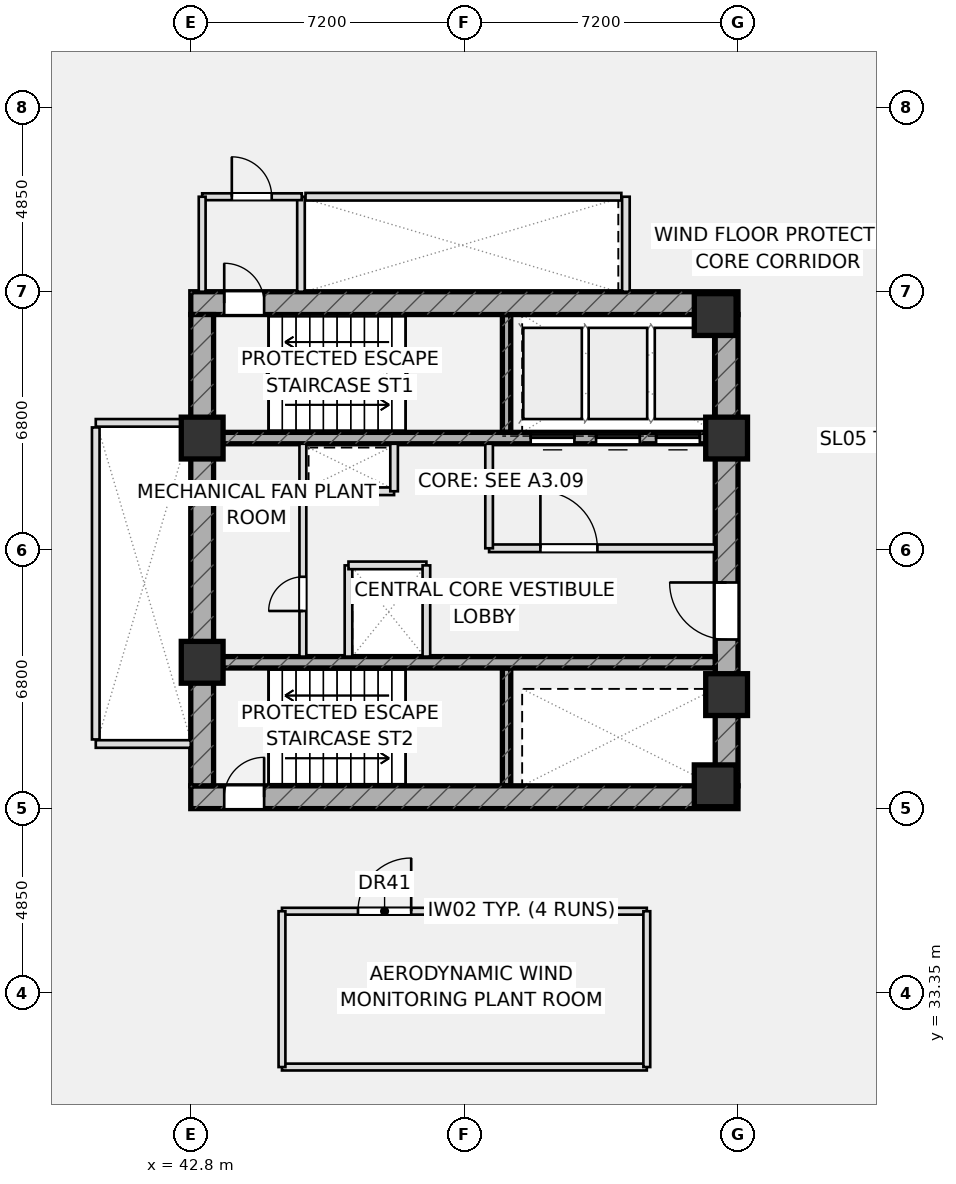
"""IFC4 building model, lengths in metres.
Left out: names, types, materials, properties, quantities, classifications, styles, units other than length and angle.
Written with IfcOpenShell. Run it as: python <this file> out.ifc"""

import sys

from ifc_helpers import new_model, si_unit, direction, frame, frame_2d, origin, origin_2d, place, context, subcontext, project, spatial, rectangle, extrude, element, fill, save


model = new_model("IFC4")
c1 = context("Model", 3, precision=1e-05, world=origin(), true_north=direction((0.0, 1.0)))
c2 = subcontext(c1, "Body", "Model", "MODEL_VIEW")
j1 = project(units=[si_unit("LENGTHUNIT", "METRE"), si_unit("PLANEANGLEUNIT", "RADIAN")], contexts=[c1])
p1 = place(None, origin())
s1 = spatial("IfcSite", under=j1, at=p1, CompositionType="ELEMENT")
p2 = place(p1, origin())
s2 = spatial("IfcBuilding", under=s1, at=p2, CompositionType="ELEMENT")
p3 = place(p2, frame((0.0, 0.0, 102.8)))
s3 = spatial("IfcBuildingStorey", under=s2, at=p3, CompositionType="ELEMENT", Elevation=102.8)
for number, where, z_axis, x_axis in (
    (1, (51.11, 48.1, 0.0), (0.0, 0.0, 1.0), (0.0, 1.0, 0.0)),
    (2, (51.11, 38.8, 0.0), (0.0, 0.0, 1.0), (0.0, 1.0, 0.0)),
):
    element("IfcWall", number, at=place(p3, frame(where, z_axis=z_axis, x_axis=x_axis)), inside=s3, PredefinedType="SHEAR", context=c2, shape_type="SweptSolid", body=[
        extrude(rectangle(XDim=3.1, YDim=0.22, at=frame_2d((1.55, 0.0))), origin(), (0.0, 0.0, 1.0), 7.3),
    ])
p4 = place(p3, frame((42.8, 51.5, 0.0), z_axis=(0.0, 0.0, 1.0), x_axis=(1.0, 0.0, 0.0)))
e3 = element("IfcWall", 3, at=p4, inside=s3, PredefinedType="SHEAR", context=c2, shape_type="SweptSolid", body=[
    extrude(rectangle(XDim=14.4, YDim=0.6, at=frame_2d((7.2, 0.0))), origin(), (0.0, 0.0, 1.0), 7.3),
])
p5 = place(p4, frame((0.88, 0.0, 0.0)))
e4 = element("IfcOpeningElement", 4, at=p5, cuts=e3, PredefinedType="OPENING", context=c2, shape_type="SweptSolid", body=[
    extrude(rectangle(XDim=1.05, YDim=2.2, at=frame_2d((0.525, 1.1))), frame((0.0, 0.31, 0.0), z_axis=(0.0, -1.0, 0.0), x_axis=(1.0, 0.0, 0.0)), (0.0, 0.0, 1.0), 0.62),
])
p6 = place(p3, frame((42.8, 38.5, 0.0), z_axis=(0.0, 0.0, 1.0), x_axis=(1.0, 0.0, 0.0)))
e5 = element("IfcWall", 5, at=p6, inside=s3, PredefinedType="SHEAR", context=c2, shape_type="SweptSolid", body=[
    extrude(rectangle(XDim=14.4, YDim=0.6, at=frame_2d((7.2, 0.0))), origin(), (0.0, 0.0, 1.0), 7.3),
])
p7 = place(p6, frame((0.88, 0.0, 0.0)))
e6 = element("IfcOpeningElement", 6, at=p7, cuts=e5, PredefinedType="OPENING", context=c2, shape_type="SweptSolid", body=[
    extrude(rectangle(XDim=1.05, YDim=2.2, at=frame_2d((0.525, 1.1))), frame((0.0, 0.31, 0.0), z_axis=(0.0, -1.0, 0.0), x_axis=(1.0, 0.0, 0.0)), (0.0, 0.0, 1.0), 0.62),
])
p8 = place(p3, frame((43.1, 38.8, 0.0), z_axis=(0.0, 0.0, 1.0), x_axis=(0.0, 1.0, 0.0)))
e7 = element("IfcWall", 7, at=p8, inside=s3, PredefinedType="SHEAR", context=c2, shape_type="SweptSolid", body=[
    extrude(rectangle(XDim=12.4, YDim=0.6, at=frame_2d((6.2, 0.0))), origin(), (0.0, 0.0, 1.0), 7.3),
])
p9 = place(p3, frame((56.9, 38.8, 0.0), z_axis=(0.0, 0.0, 1.0), x_axis=(0.0, 1.0, 0.0)))
e8 = element("IfcWall", 8, at=p9, inside=s3, PredefinedType="SHEAR", context=c2, shape_type="SweptSolid", body=[
    extrude(rectangle(XDim=12.4, YDim=0.6, at=frame_2d((6.2, 0.0))), origin(), (0.0, 0.0, 1.0), 7.3),
])
p10 = place(p9, frame((3.85, 0.0, 0.0)))
e9 = element("IfcOpeningElement", 9, at=p10, cuts=e8, PredefinedType="OPENING", context=c2, shape_type="SweptSolid", body=[
    extrude(rectangle(XDim=1.5, YDim=2.2, at=frame_2d((0.75, 1.1))), frame((0.0, 0.31, 0.0), z_axis=(0.0, -1.0, 0.0), x_axis=(1.0, 0.0, 0.0)), (0.0, 0.0, 1.0), 0.62),
])
p11 = place(p3, frame((43.4, 47.95, 0.0), z_axis=(0.0, 0.0, 1.0), x_axis=(1.0, 0.0, 0.0)))
e10 = element("IfcWall", 10, at=p11, inside=s3, PredefinedType="SHEAR", context=c2, shape_type="SweptSolid", body=[
    extrude(rectangle(XDim=13.2, YDim=0.3, at=frame_2d((6.6, 0.0))), origin(), (0.0, 0.0, 1.0), 7.3),
])
p12 = place(p11, frame((8.345, 0.0, 0.0)))
e11 = element("IfcOpeningElement", 11, at=p12, cuts=e10, PredefinedType="OPENING", context=c2, shape_type="SweptSolid", body=[
    extrude(rectangle(XDim=1.15, YDim=2.2, at=frame_2d((0.575, 1.1))), frame((0.0, 0.16, 0.0), z_axis=(0.0, -1.0, 0.0), x_axis=(1.0, 0.0, 0.0)), (0.0, 0.0, 1.0), 0.32),
])
p13 = place(p11, frame((10.065, 0.0, 0.0)))
e12 = element("IfcOpeningElement", 12, at=p13, cuts=e10, PredefinedType="OPENING", context=c2, shape_type="SweptSolid", body=[
    extrude(rectangle(XDim=1.15, YDim=2.2, at=frame_2d((0.575, 1.1))), frame((0.0, 0.16, 0.0), z_axis=(0.0, -1.0, 0.0), x_axis=(1.0, 0.0, 0.0)), (0.0, 0.0, 1.0), 0.32),
])
p14 = place(p11, frame((11.645, 0.0, 0.0)))
e13 = element("IfcOpeningElement", 13, at=p14, cuts=e10, PredefinedType="OPENING", context=c2, shape_type="SweptSolid", body=[
    extrude(rectangle(XDim=1.15, YDim=2.2, at=frame_2d((0.575, 1.1))), frame((0.0, 0.16, 0.0), z_axis=(0.0, -1.0, 0.0), x_axis=(1.0, 0.0, 0.0)), (0.0, 0.0, 1.0), 0.32),
])
p15 = place(p3, frame((43.4, 42.05, 0.0), z_axis=(0.0, 0.0, 1.0), x_axis=(1.0, 0.0, 0.0)))
e14 = element("IfcWall", 14, at=p15, inside=s3, PredefinedType="SHEAR", context=c2, shape_type="SweptSolid", body=[
    extrude(rectangle(XDim=13.2, YDim=0.3, at=frame_2d((6.6, 0.0))), origin(), (0.0, 0.0, 1.0), 7.3),
])
for number, where, z_axis, x_axis in (
    (15, (43.1, 47.95, 0.0), (0.0, 0.0, 1.0), (1.0, 0.0, 0.0)),
    (16, (56.9, 47.95, 0.0), (0.0, 0.0, 1.0), (1.0, 0.0, 0.0)),
    (17, (56.6, 51.2, 0.0), (0.0, 0.0, 1.0), (1.0, 0.0, 0.0)),
    (18, (43.1, 42.05, 0.0), (0.0, 0.0, 1.0), (1.0, 0.0, 0.0)),
    (19, (56.9, 41.2, 0.0), (0.0, 0.0, 1.0), (1.0, 0.0, 0.0)),
    (20, (56.6, 38.8, 0.0), (0.0, 0.0, 1.0), (1.0, 0.0, 0.0)),
):
    element("IfcColumn", number, at=place(p3, frame(where, z_axis=z_axis, x_axis=x_axis)), inside=s3, PredefinedType="COLUMN", context=c2, shape_type="SweptSolid", body=[
        extrude(rectangle(XDim=1.1, YDim=1.1, at=origin_2d()), origin(), (0.0, 0.0, 1.0), 7.3),
    ])
for number, where, z_axis, x_axis in (
    (21, (40.3, 39.9, 0.0), (0.0, 0.0, 1.0), (1.0, 0.0, 0.0)),
    (22, (40.3, 48.35, 0.0), (0.0, 0.0, 1.0), (1.0, 0.0, 0.0)),
    (23, (45.7, 51.8, 0.0), (0.0, 0.0, 1.0), (0.0, 1.0, 0.0)),
):
    element("IfcWall", number, at=place(p3, frame(where, z_axis=z_axis, x_axis=x_axis)), inside=s3, PredefinedType="PARTITIONING", context=c2, shape_type="SweptSolid", body=[
        extrude(rectangle(XDim=2.5, YDim=0.2, at=frame_2d((1.25, 0.0))), origin(), (0.0, 0.0, 1.0), 7.3),
    ])
p16 = place(p3, frame((54.25, 51.8, 0.0), z_axis=(0.0, 0.0, 1.0), x_axis=(0.0, 1.0, 0.0)))
e24 = element("IfcWall", 24, at=p16, inside=s3, PredefinedType="PARTITIONING", context=c2, shape_type="SweptSolid", body=[
    extrude(rectangle(XDim=2.5, YDim=0.2, at=frame_2d((1.25, 0.0))), origin(), (0.0, 0.0, 1.0), 4.775),
])
p17 = place(p3, frame((45.75, 46.55, 0.0), z_axis=(0.0, 0.0, 1.0), x_axis=(1.0, 0.0, 0.0)))
e25 = element("IfcWall", 25, at=p17, inside=s3, PredefinedType="PARTITIONING", context=c2, shape_type="SweptSolid", body=[
    extrude(rectangle(XDim=2.4, YDim=0.2, at=frame_2d((1.2, 0.0))), origin(), (0.0, 0.0, 1.0), 7.3),
])
p18 = place(p3, frame((48.15, 46.55, 0.0), z_axis=(0.0, 0.0, 1.0), x_axis=(0.0, 1.0, 0.0)))
e26 = element("IfcWall", 26, at=p18, inside=s3, PredefinedType="PARTITIONING", context=c2, shape_type="SweptSolid", body=[
    extrude(rectangle(XDim=1.25, YDim=0.2, at=frame_2d((0.625, 0.0))), origin(), (0.0, 0.0, 1.0), 7.3),
])
p19 = place(p3, frame((46.95, 42.2, 0.0), z_axis=(0.0, 0.0, 1.0), x_axis=(0.0, 1.0, 0.0)))
e27 = element("IfcWall", 27, at=p19, inside=s3, PredefinedType="PARTITIONING", context=c2, shape_type="SweptSolid", body=[
    extrude(rectangle(XDim=2.4, YDim=0.2, at=frame_2d((1.2, 0.0))), origin(), (0.0, 0.0, 1.0), 7.3),
])
p20 = place(p3, frame((46.95, 44.6, 0.0), z_axis=(0.0, 0.0, 1.0), x_axis=(1.0, 0.0, 0.0)))
e28 = element("IfcWall", 28, at=p20, inside=s3, PredefinedType="PARTITIONING", context=c2, shape_type="SweptSolid", body=[
    extrude(rectangle(XDim=2.05, YDim=0.2, at=frame_2d((1.025, 0.0))), origin(), (0.0, 0.0, 1.0), 7.3),
])
p21 = place(p3, frame((50.65, 45.05, 0.0), z_axis=(0.0, 0.0, 1.0), x_axis=(1.0, 0.0, 0.0)))
e29 = element("IfcWall", 29, at=p21, inside=s3, PredefinedType="PARTITIONING", context=c2, shape_type="SweptSolid", body=[
    extrude(rectangle(XDim=5.95, YDim=0.2, at=frame_2d((2.975, 0.0))), origin(), (0.0, 0.0, 1.0), 7.3),
])
p22 = place(p21, frame((1.35, 0.0, 0.0)))
e30 = element("IfcOpeningElement", 30, at=p22, cuts=e29, PredefinedType="OPENING", context=c2, shape_type="SweptSolid", body=[
    extrude(rectangle(XDim=1.5, YDim=2.2, at=frame_2d((0.75, 1.1))), frame((0.0, 0.11, 0.0), z_axis=(0.0, -1.0, 0.0), x_axis=(1.0, 0.0, 0.0)), (0.0, 0.0, 1.0), 0.22),
])
p23 = place(p3, frame((50.65, 45.05, 0.0), z_axis=(0.0, 0.0, 1.0), x_axis=(0.0, 1.0, 0.0)))
e31 = element("IfcWall", 31, at=p23, inside=s3, PredefinedType="PARTITIONING", context=c2, shape_type="SweptSolid", body=[
    extrude(rectangle(XDim=2.75, YDim=0.2, at=frame_2d((1.375, 0.0))), origin(), (0.0, 0.0, 1.0), 7.3),
])
p24 = place(p3, frame((45.75, 42.2, 0.0), z_axis=(0.0, 0.0, 1.0), x_axis=(0.0, 1.0, 0.0)))
e32 = element("IfcWall", 32, at=p24, inside=s3, PredefinedType="PARTITIONING", context=c2, shape_type="SweptSolid", body=[
    extrude(rectangle(XDim=5.6, YDim=0.18, at=frame_2d((2.8, 0.0))), origin(), (0.0, 0.0, 1.0), 7.3),
])
p25 = place(p24, frame((1.2, 0.0, 0.0)))
e33 = element("IfcOpeningElement", 33, at=p25, cuts=e32, PredefinedType="OPENING", context=c2, shape_type="SweptSolid", body=[
    extrude(rectangle(XDim=0.9, YDim=2.05, at=frame_2d((0.45, 1.025))), frame((0.0, 0.1, 0.0), z_axis=(0.0, -1.0, 0.0), x_axis=(1.0, 0.0, 0.0)), (0.0, 0.0, 1.0), 0.2),
])
p26 = place(p3, frame((43.1, 54.3, 0.0), z_axis=(0.0, 0.0, 1.0), x_axis=(1.0, 0.0, 0.0)))
e34 = element("IfcWall", 34, at=p26, inside=s3, PredefinedType="PARTITIONING", context=c2, shape_type="SweptSolid", body=[
    extrude(rectangle(XDim=2.62, YDim=0.18, at=frame_2d((1.31, 0.0))), origin(), (0.0, 0.0, 1.0), 4.775),
])
p27 = place(p26, frame((0.78, 0.0, 0.0)))
e35 = element("IfcOpeningElement", 35, at=p27, cuts=e34, PredefinedType="OPENING", context=c2, shape_type="SweptSolid", body=[
    extrude(rectangle(XDim=1.05, YDim=2.2, at=frame_2d((0.525, 1.1))), frame((0.0, 0.1, 0.0), z_axis=(0.0, -1.0, 0.0), x_axis=(1.0, 0.0, 0.0)), (0.0, 0.0, 1.0), 0.2),
])
p28 = place(p3, frame((43.1, 51.8, 0.0), z_axis=(0.0, 0.0, 1.0), x_axis=(0.0, 1.0, 0.0)))
e36 = element("IfcWall", 36, at=p28, inside=s3, PredefinedType="PARTITIONING", context=c2, shape_type="SweptSolid", body=[
    extrude(rectangle(XDim=2.5, YDim=0.18, at=frame_2d((1.25, 0.0))), origin(), (0.0, 0.0, 1.0), 4.775),
])
p29 = place(p3, frame((45.2, 35.5, 0.0), z_axis=(0.0, 0.0, 1.0), x_axis=(1.0, 0.0, 0.0)))
e37 = element("IfcWall", 37, at=p29, inside=s3, PredefinedType="PARTITIONING", context=c2, shape_type="SweptSolid", body=[
    extrude(rectangle(XDim=9.6, YDim=0.18, at=frame_2d((4.8, 0.0))), origin(), (0.0, 0.0, 1.0), 7.3),
])
p30 = place(p29, frame((2.0, 0.0, 0.0)))
e38 = element("IfcOpeningElement", 38, at=p30, cuts=e37, PredefinedType="OPENING", context=c2, shape_type="SweptSolid", body=[
    extrude(rectangle(XDim=1.4, YDim=2.15, at=frame_2d((0.7, 1.075))), frame((0.0, 0.1, 0.0), z_axis=(0.0, -1.0, 0.0), x_axis=(1.0, 0.0, 0.0)), (0.0, 0.0, 1.0), 0.2),
])
p31 = place(p3, frame((45.2, 31.4, 0.0), z_axis=(0.0, 0.0, 1.0), x_axis=(1.0, 0.0, 0.0)))
e39 = element("IfcWall", 39, at=p31, inside=s3, PredefinedType="PARTITIONING", context=c2, shape_type="SweptSolid", body=[
    extrude(rectangle(XDim=9.6, YDim=0.18, at=frame_2d((4.8, 0.0))), origin(), (0.0, 0.0, 1.0), 4.775),
])
p32 = place(p3, frame((45.2, 31.4, 0.0), z_axis=(0.0, 0.0, 1.0), x_axis=(0.0, 1.0, 0.0)))
e40 = element("IfcWall", 40, at=p32, inside=s3, PredefinedType="PARTITIONING", context=c2, shape_type="SweptSolid", body=[
    extrude(rectangle(XDim=4.1, YDim=0.18, at=frame_2d((2.05, 0.0))), origin(), (0.0, 0.0, 1.0), 4.775),
])
p33 = place(p3, frame((54.8, 31.4, 0.0), z_axis=(0.0, 0.0, 1.0), x_axis=(0.0, 1.0, 0.0)))
e41 = element("IfcWall", 41, at=p33, inside=s3, PredefinedType="PARTITIONING", context=c2, shape_type="SweptSolid", body=[
    extrude(rectangle(XDim=4.1, YDim=0.18, at=frame_2d((2.05, 0.0))), origin(), (0.0, 0.0, 1.0), 7.3),
])
p34 = place(p3, frame((40.3, 40.02, 0.0), z_axis=(0.0, 0.0, 1.0), x_axis=(0.0, 1.0, 0.0)))
e42 = element("IfcWall", 42, at=p34, inside=s3, PredefinedType="PARTITIONING", context=c2, shape_type="SweptSolid", body=[
    extrude(rectangle(XDim=8.21, YDim=0.2, at=frame_2d((4.105, 0.0))), origin(), (0.0, 0.0, 1.0), 7.3),
])
p35 = place(p3, frame((49.0, 42.2, 0.0), z_axis=(0.0, 0.0, 1.0), x_axis=(0.0, 1.0, 0.0)))
e43 = element("IfcWall", 43, at=p35, inside=s3, PredefinedType="PARTITIONING", context=c2, shape_type="SweptSolid", body=[
    extrude(rectangle(XDim=2.4, YDim=0.2, at=frame_2d((1.2, 0.0))), origin(), (0.0, 0.0, 1.0), 7.3),
])
p36 = place(p3, frame((45.82, 54.3, 0.0), z_axis=(0.0, 0.0, 1.0), x_axis=(1.0, 0.0, 0.0)))
e44 = element("IfcWall", 44, at=p36, inside=s3, PredefinedType="PARTITIONING", context=c2, shape_type="SweptSolid", body=[
    extrude(rectangle(XDim=8.31, YDim=0.2, at=frame_2d((4.155, 0.0))), origin(), (0.0, 0.0, 1.0), 4.775),
])
p37 = place(p5, origin())
e45 = element("IfcDoor", 45, at=p37, inside=s3, OperationType="SINGLE_SWING_LEFT", PredefinedType="DOOR", context=c2, shape_type="SweptSolid", body=[
    extrude(rectangle(XDim=1.05, YDim=2.2, at=frame_2d((0.525, 1.1))), frame((0.0, 0.025, 0.0), z_axis=(0.0, -1.0, 0.0), x_axis=(1.0, 0.0, 0.0)), (0.0, 0.0, 1.0), 0.05),
])
fill(e4, e45)
p38 = place(p7, origin())
e46 = element("IfcDoor", 46, at=p38, inside=s3, OperationType="SINGLE_SWING_RIGHT", PredefinedType="DOOR", context=c2, shape_type="SweptSolid", body=[
    extrude(rectangle(XDim=1.05, YDim=2.2, at=frame_2d((0.525, 1.1))), frame((0.0, 0.025, 0.0), z_axis=(0.0, -1.0, 0.0), x_axis=(1.0, 0.0, 0.0)), (0.0, 0.0, 1.0), 0.05),
])
fill(e6, e46)
p39 = place(p10, origin())
e47 = element("IfcDoor", 47, at=p39, inside=s3, OperationType="SINGLE_SWING_RIGHT", PredefinedType="DOOR", context=c2, shape_type="SweptSolid", body=[
    extrude(rectangle(XDim=1.5, YDim=2.2, at=frame_2d((0.75, 1.1))), frame((0.0, 0.025, 0.0), z_axis=(0.0, -1.0, 0.0), x_axis=(1.0, 0.0, 0.0)), (0.0, 0.0, 1.0), 0.05),
])
fill(e9, e47)
p40 = place(p22, origin())
e48 = element("IfcDoor", 48, at=p40, inside=s3, OperationType="SINGLE_SWING_LEFT", PredefinedType="DOOR", context=c2, shape_type="SweptSolid", body=[
    extrude(rectangle(XDim=1.5, YDim=2.2, at=frame_2d((0.75, 1.1))), frame((0.0, 0.025, 0.0), z_axis=(0.0, -1.0, 0.0), x_axis=(1.0, 0.0, 0.0)), (0.0, 0.0, 1.0), 0.05),
])
fill(e30, e48)
p41 = place(p25, origin())
e49 = element("IfcDoor", 49, at=p41, inside=s3, OperationType="SINGLE_SWING_LEFT", PredefinedType="DOOR", context=c2, shape_type="SweptSolid", body=[
    extrude(rectangle(XDim=0.9, YDim=2.05, at=frame_2d((0.45, 1.025))), frame((0.0, 0.025, 0.0), z_axis=(0.0, -1.0, 0.0), x_axis=(1.0, 0.0, 0.0)), (0.0, 0.0, 1.0), 0.05),
])
fill(e33, e49)
p42 = place(p27, origin())
e50 = element("IfcDoor", 50, at=p42, inside=s3, OperationType="SINGLE_SWING_LEFT", PredefinedType="DOOR", context=c2, shape_type="SweptSolid", body=[
    extrude(rectangle(XDim=1.05, YDim=2.2, at=frame_2d((0.525, 1.1))), frame((0.0, 0.025, 0.0), z_axis=(0.0, -1.0, 0.0), x_axis=(1.0, 0.0, 0.0)), (0.0, 0.0, 1.0), 0.05),
])
fill(e35, e50)
p43 = place(p30, origin())
e51 = element("IfcDoor", 51, at=p43, inside=s3, OperationType="SINGLE_SWING_RIGHT", PredefinedType="DOOR", context=c2, shape_type="SweptSolid", body=[
    extrude(rectangle(XDim=1.4, YDim=2.15, at=frame_2d((0.7, 1.075))), frame((0.0, 0.025, 0.0), z_axis=(0.0, -1.0, 0.0), x_axis=(1.0, 0.0, 0.0)), (0.0, 0.0, 1.0), 0.05),
])
fill(e38, e51)
p44 = place(p12, origin())
e52 = element("IfcDoor", 52, at=p44, inside=s3, OperationType="SLIDING_TO_LEFT", PredefinedType="DOOR", context=c2, shape_type="SweptSolid", body=[
    extrude(rectangle(XDim=1.15, YDim=2.2, at=frame_2d((0.575, 1.1))), frame((0.0, 0.025, 0.0), z_axis=(0.0, -1.0, 0.0), x_axis=(1.0, 0.0, 0.0)), (0.0, 0.0, 1.0), 0.05),
])
fill(e11, e52)
p45 = place(p13, origin())
e53 = element("IfcDoor", 53, at=p45, inside=s3, OperationType="SLIDING_TO_LEFT", PredefinedType="DOOR", context=c2, shape_type="SweptSolid", body=[
    extrude(rectangle(XDim=1.15, YDim=2.2, at=frame_2d((0.575, 1.1))), frame((0.0, 0.025, 0.0), z_axis=(0.0, -1.0, 0.0), x_axis=(1.0, 0.0, 0.0)), (0.0, 0.0, 1.0), 0.05),
])
fill(e12, e53)
p46 = place(p14, origin())
e54 = element("IfcDoor", 54, at=p46, inside=s3, OperationType="SLIDING_TO_LEFT", PredefinedType="DOOR", context=c2, shape_type="SweptSolid", body=[
    extrude(rectangle(XDim=1.15, YDim=2.2, at=frame_2d((0.575, 1.1))), frame((0.0, 0.025, 0.0), z_axis=(0.0, -1.0, 0.0), x_axis=(1.0, 0.0, 0.0)), (0.0, 0.0, 1.0), 0.05),
])
fill(e13, e54)
save(model, sys.argv[1])
